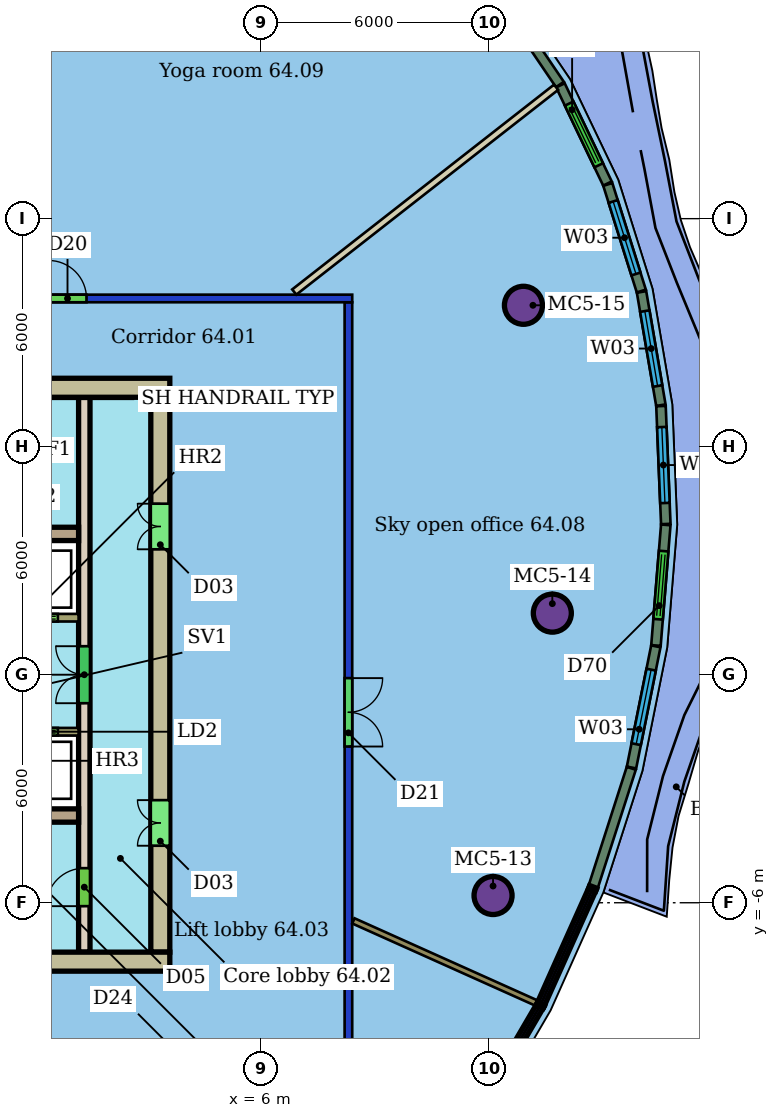
"""IFC4 building model, lengths in metres.
Left out: names, types, materials, properties, quantities, classifications, styles, units other than length and angle.
Written with IfcOpenShell. Run it as: python <this file> out.ifc"""

import sys

from ifc_helpers import new_model, si_unit, direction, frame, frame_2d, origin, origin_2d, place, context, subcontext, project, spatial, rectangle, hollow_circle, extrude, element, fill, save


model = new_model("IFC4")
c1 = context("Model", 3, precision=1e-05, world=origin(), true_north=direction((0.0, 1.0)))
c2 = subcontext(c1, "Body", "Model", "MODEL_VIEW")
j1 = project(units=[si_unit("LENGTHUNIT", "METRE"), si_unit("PLANEANGLEUNIT", "RADIAN")], contexts=[c1])
p1 = place(None, origin())
s1 = spatial("IfcSite", under=j1, at=p1, CompositionType="ELEMENT")
p2 = place(p1, origin())
s2 = spatial("IfcBuilding", under=s1, at=p2, CompositionType="ELEMENT")
p3 = place(p2, frame((0.0, 0.0, 261.3)))
s3 = spatial("IfcBuildingStorey", under=s2, at=p3, CompositionType="ELEMENT", Elevation=261.3)
for number, where, z_axis, x_axis in (
    (1, (12.106, -5.81, 0.0), (0.0, 0.0, 1.0), (1.0, 0.0, 0.0)),
    (2, (13.666, 1.62, 0.0), (0.0, 0.0, 1.0), (1.0, 0.0, 0.0)),
    (3, (12.906, 9.72, 0.0), (0.0, 0.0, 1.0), (1.0, 0.0, 0.0)),
):
    element("IfcColumn", number, at=place(p3, frame(where, z_axis=z_axis, x_axis=x_axis)), inside=s3, PredefinedType="COLUMN", context=c2, shape_type="SweptSolid", body=[
        extrude(hollow_circle(Radius=0.5, WallThickness=0.04, at=origin_2d()), origin(), (0.0, 0.0, 1.0), 3.45),
    ])
p4 = place(p3, frame((-20.4, 9.9, 0.0), z_axis=(0.0, 0.0, 1.0), x_axis=(1.0, 0.0, 0.0)))
e4 = element("IfcWall", 4, at=p4, inside=s3, PredefinedType="PARTITIONING", context=c2, shape_type="SweptSolid", body=[
    extrude(rectangle(XDim=28.8, YDim=0.2, at=frame_2d((14.4, 0.0))), origin(), (0.0, 0.0, 1.0), 3.1),
])
p5 = place(p4, frame((9.729, 0.0, 0.0)))
e5 = element("IfcOpeningElement", 5, at=p5, cuts=e4, PredefinedType="OPENING", context=c2, shape_type="SweptSolid", body=[
    extrude(rectangle(XDim=1.5, YDim=2.1, at=frame_2d((0.75, 1.05))), frame((0.0, 0.11, 0.0), z_axis=(0.0, -1.0, 0.0), x_axis=(1.0, 0.0, 0.0)), (0.0, 0.0, 1.0), 0.22),
])
p6 = place(p4, frame((20.808, 0.0, 0.0)))
e6 = element("IfcOpeningElement", 6, at=p6, cuts=e4, PredefinedType="OPENING", context=c2, shape_type="SweptSolid", body=[
    extrude(rectangle(XDim=1.0, YDim=2.1, at=frame_2d((0.5, 1.05))), frame((0.0, 0.11, 0.0), z_axis=(0.0, -1.0, 0.0), x_axis=(1.0, 0.0, 0.0)), (0.0, 0.0, 1.0), 0.22),
])
p7 = place(p3, frame((8.3, 9.8, 0.0), z_axis=(0.0, 0.0, 1.0), x_axis=(0.0, -1.0, 0.0)))
e7 = element("IfcWall", 7, at=p7, inside=s3, PredefinedType="PARTITIONING", context=c2, shape_type="SweptSolid", body=[
    extrude(rectangle(XDim=19.6, YDim=0.2, at=frame_2d((9.8, 0.0))), origin(), (0.0, 0.0, 1.0), 3.1),
])
p8 = place(p7, frame((9.889, 0.0, 0.0)))
e8 = element("IfcOpeningElement", 8, at=p8, cuts=e7, PredefinedType="OPENING", context=c2, shape_type="SweptSolid", body=[
    extrude(rectangle(XDim=1.8, YDim=2.1, at=frame_2d((0.9, 1.05))), frame((0.0, 0.11, 0.0), z_axis=(0.0, -1.0, 0.0), x_axis=(1.0, 0.0, 0.0)), (0.0, 0.0, 1.0), 0.22),
])
p9 = place(p3, frame((3.145, 23.736, 0.0), z_axis=(0.0, 0.0, 1.0), x_axis=(-0.359540454633, -0.933129498774, 0.0)))
e9 = element("IfcWall", 9, at=p9, inside=s3, PredefinedType="PARTITIONING", context=c2, shape_type="SweptSolid", body=[
    extrude(rectangle(XDim=14.686, YDim=0.175, at=frame_2d((7.343, 0.0))), origin(), (0.0, 0.0, 1.0), 3.45),
])
p10 = place(p3, frame((13.243, -8.637, 0.0), z_axis=(0.0, 0.0, 1.0), x_axis=(-0.912328117743, 0.409459894954, 0.0)))
e10 = element("IfcWall", 10, at=p10, inside=s3, PredefinedType="PARTITIONING", context=c2, shape_type="SweptSolid", body=[
    extrude(rectangle(XDim=5.274, YDim=0.15, at=frame_2d((2.637, 0.0))), origin(), (0.0, 0.0, 1.0), 3.45),
])
p11 = place(p3, frame((13.765, 15.457, 0.0), z_axis=(0.0, 0.0, 1.0), x_axis=(-0.787708163729, -0.616048576651, 0.0)))
e11 = element("IfcWall", 11, at=p11, inside=s3, PredefinedType="PARTITIONING", context=c2, shape_type="SweptSolid", body=[
    extrude(rectangle(XDim=8.747, YDim=0.175, at=frame_2d((4.374, 0.0))), origin(), (0.0, 0.0, 1.0), 3.45),
])
p12 = place(p3, frame((14.745, -5.569, 0.0), z_axis=(0.0, 0.0, 1.0), x_axis=(0.305926817151, 0.95205503126, 0.0)))
e12 = element("IfcWall", 12, at=p12, inside=s3, PredefinedType="SOLIDWALL", context=c2, shape_type="SweptSolid", body=[
    extrude(rectangle(XDim=3.262, YDim=0.25, at=frame_2d((1.631, 0.0))), origin(), (0.0, 0.0, 1.0), 3.15),
])
p13 = place(p3, frame((15.749, -2.442, 0.0), z_axis=(0.0, 0.0, 1.0), x_axis=(0.196910086412, 0.980421551104, 0.0)))
e13 = element("IfcWall", 13, at=p13, inside=s3, PredefinedType="SOLIDWALL", context=c2, shape_type="SweptSolid", body=[
    extrude(rectangle(XDim=3.252, YDim=0.25, at=frame_2d((1.626, 0.0))), origin(), (0.0, 0.0, 1.0), 3.15),
])
p14 = place(p13, frame((0.626, 0.0, 0.9)))
e14 = element("IfcOpeningElement", 14, at=p14, cuts=e13, PredefinedType="OPENING", context=c2, shape_type="SweptSolid", body=[
    extrude(rectangle(XDim=2.0, YDim=2.1, at=frame_2d((1.0, 1.05))), frame((0.0, 0.135, 0.0), z_axis=(0.0, -1.0, 0.0), x_axis=(1.0, 0.0, 0.0)), (0.0, 0.0, 1.0), 0.27),
])
p15 = place(p3, frame((16.393, 0.769, 0.0), z_axis=(0.0, 0.0, 1.0), x_axis=(0.081211205115, 0.996696914896, 0.0)))
e15 = element("IfcWall", 15, at=p15, inside=s3, PredefinedType="SOLIDWALL", context=c2, shape_type="SweptSolid", body=[
    extrude(rectangle(XDim=3.184, YDim=0.25, at=frame_2d((1.592, 0.0))), origin(), (0.0, 0.0, 1.0), 3.15),
])
p16 = place(p15, frame((0.692, 0.0, 0.0)))
e16 = element("IfcOpeningElement", 16, at=p16, cuts=e15, PredefinedType="OPENING", context=c2, shape_type="SweptSolid", body=[
    extrude(rectangle(XDim=1.8, YDim=2.4, at=frame_2d((0.9, 1.2))), frame((0.0, 0.135, 0.0), z_axis=(0.0, -1.0, 0.0), x_axis=(1.0, 0.0, 0.0)), (0.0, 0.0, 1.0), 0.27),
])
p17 = place(p3, frame((16.652, 3.965, 0.0), z_axis=(0.0, 0.0, 1.0), x_axis=(-0.040878469358, 0.999164126029, 0.0)))
e17 = element("IfcWall", 17, at=p17, inside=s3, PredefinedType="SOLIDWALL", context=c2, shape_type="SweptSolid", body=[
    extrude(rectangle(XDim=3.106, YDim=0.25, at=frame_2d((1.553, 0.0))), origin(), (0.0, 0.0, 1.0), 3.15),
])
p18 = place(p17, frame((0.553, 0.0, 0.9)))
e18 = element("IfcOpeningElement", 18, at=p18, cuts=e17, PredefinedType="OPENING", context=c2, shape_type="SweptSolid", body=[
    extrude(rectangle(XDim=2.0, YDim=2.1, at=frame_2d((1.0, 1.05))), frame((0.0, 0.135, 0.0), z_axis=(0.0, -1.0, 0.0), x_axis=(1.0, 0.0, 0.0)), (0.0, 0.0, 1.0), 0.27),
])
p19 = place(p3, frame((16.522, 7.092, 0.0), z_axis=(0.0, 0.0, 1.0), x_axis=(-0.168497464049, 0.985702087149, 0.0)))
e19 = element("IfcWall", 19, at=p19, inside=s3, PredefinedType="SOLIDWALL", context=c2, shape_type="SweptSolid", body=[
    extrude(rectangle(XDim=3.022, YDim=0.25, at=frame_2d((1.511, 0.0))), origin(), (0.0, 0.0, 1.0), 3.15),
])
p20 = place(p19, frame((0.511, 0.0, 0.9)))
e20 = element("IfcOpeningElement", 20, at=p20, cuts=e19, PredefinedType="OPENING", context=c2, shape_type="SweptSolid", body=[
    extrude(rectangle(XDim=2.0, YDim=2.1, at=frame_2d((1.0, 1.05))), frame((0.0, 0.135, 0.0), z_axis=(0.0, -1.0, 0.0), x_axis=(1.0, 0.0, 0.0)), (0.0, 0.0, 1.0), 0.27),
])
p21 = place(p3, frame((16.007, 10.096, 0.0), z_axis=(0.0, 0.0, 1.0), x_axis=(-0.299763978955, 0.954013394519, 0.0)))
e21 = element("IfcWall", 21, at=p21, inside=s3, PredefinedType="SOLIDWALL", context=c2, shape_type="SweptSolid", body=[
    extrude(rectangle(XDim=2.94, YDim=0.25, at=frame_2d((1.47, 0.0))), origin(), (0.0, 0.0, 1.0), 3.15),
])
p22 = place(p21, frame((0.47, 0.0, 0.9)))
e22 = element("IfcOpeningElement", 22, at=p22, cuts=e21, PredefinedType="OPENING", context=c2, shape_type="SweptSolid", body=[
    extrude(rectangle(XDim=2.0, YDim=2.1, at=frame_2d((1.0, 1.05))), frame((0.0, 0.135, 0.0), z_axis=(0.0, -1.0, 0.0), x_axis=(1.0, 0.0, 0.0)), (0.0, 0.0, 1.0), 0.27),
])
p23 = place(p3, frame((15.116, 12.925, 0.0), z_axis=(0.0, 0.0, 1.0), x_axis=(-0.432043625995, 0.901852707063, 0.0)))
e23 = element("IfcWall", 23, at=p23, inside=s3, PredefinedType="SOLIDWALL", context=c2, shape_type="SweptSolid", body=[
    extrude(rectangle(XDim=2.864, YDim=0.25, at=frame_2d((1.432, 0.0))), origin(), (0.0, 0.0, 1.0), 3.15),
])
p24 = place(p23, frame((0.532, 0.0, 0.0)))
e24 = element("IfcOpeningElement", 24, at=p24, cuts=e23, PredefinedType="OPENING", context=c2, shape_type="SweptSolid", body=[
    extrude(rectangle(XDim=1.8, YDim=2.4, at=frame_2d((0.9, 1.2))), frame((0.0, 0.135, 0.0), z_axis=(0.0, -1.0, 0.0), x_axis=(1.0, 0.0, 0.0)), (0.0, 0.0, 1.0), 0.27),
])
p25 = place(p3, frame((13.866, 15.531, 0.0), z_axis=(0.0, 0.0, 1.0), x_axis=(-0.561217901017, 0.827668090226, 0.0)))
e25 = element("IfcWall", 25, at=p25, inside=s3, PredefinedType="SOLIDWALL", context=c2, shape_type="SweptSolid", body=[
    extrude(rectangle(XDim=2.759, YDim=0.25, at=frame_2d((1.379, 0.0))), origin(), (0.0, 0.0, 1.0), 3.15),
])
p26 = place(p3, frame((3.6, 7.55, 0.0), z_axis=(0.0, 0.0, 1.0), x_axis=(-1.0, 0.0, 0.0)))
e26 = element("IfcWall", 26, at=p26, inside=s3, PredefinedType="SHEAR", context=c2, shape_type="SweptSolid", body=[
    extrude(rectangle(XDim=9.6, YDim=0.5, at=frame_2d((4.8, 0.0))), origin(), (0.0, 0.0, 1.0), 3.3),
])
p27 = place(p26, frame((3.2, 0.0, 0.0)))
e27 = element("IfcOpeningElement", 27, at=p27, cuts=e26, PredefinedType="OPENING", context=c2, shape_type="SweptSolid", body=[
    extrude(rectangle(XDim=1.2, YDim=2.1, at=frame_2d((0.6, 1.05))), frame((0.0, 0.26, 0.0), z_axis=(0.0, -1.0, 0.0), x_axis=(1.0, 0.0, 0.0)), (0.0, 0.0, 1.0), 0.52),
])
p28 = place(p3, frame((-15.6, -7.55, 0.0), z_axis=(0.0, 0.0, 1.0), x_axis=(1.0, 0.0, 0.0)))
e28 = element("IfcWall", 28, at=p28, inside=s3, PredefinedType="SHEAR", context=c2, shape_type="SweptSolid", body=[
    extrude(rectangle(XDim=19.2, YDim=0.5, at=frame_2d((9.6, 0.0))), origin(), (0.0, 0.0, 1.0), 3.3),
])
p29 = place(p28, frame((3.6, 0.0, 0.0)))
e29 = element("IfcOpeningElement", 29, at=p29, cuts=e28, PredefinedType="OPENING", context=c2, shape_type="SweptSolid", body=[
    extrude(rectangle(XDim=1.2, YDim=2.1, at=frame_2d((0.6, 1.05))), frame((0.0, 0.26, 0.0), z_axis=(0.0, -1.0, 0.0), x_axis=(1.0, 0.0, 0.0)), (0.0, 0.0, 1.0), 0.52),
])
p30 = place(p3, frame((3.35, -7.3, 0.0), z_axis=(0.0, 0.0, 1.0), x_axis=(0.0, 1.0, 0.0)))
e30 = element("IfcWall", 30, at=p30, inside=s3, PredefinedType="SHEAR", context=c2, shape_type="SweptSolid", body=[
    extrude(rectangle(XDim=14.6, YDim=0.5, at=frame_2d((7.3, 0.0))), origin(), (0.0, 0.0, 1.0), 3.3),
])
p31 = place(p30, frame((2.8, 0.0, 0.0)))
e31 = element("IfcOpeningElement", 31, at=p31, cuts=e30, PredefinedType="OPENING", context=c2, shape_type="SweptSolid", body=[
    extrude(rectangle(XDim=1.2, YDim=2.1, at=frame_2d((0.6, 1.05))), frame((0.0, 0.26, 0.0), z_axis=(0.0, -1.0, 0.0), x_axis=(1.0, 0.0, 0.0)), (0.0, 0.0, 1.0), 0.52),
])
p32 = place(p30, frame((10.6, 0.0, 0.0)))
e32 = element("IfcOpeningElement", 32, at=p32, cuts=e30, PredefinedType="OPENING", context=c2, shape_type="SweptSolid", body=[
    extrude(rectangle(XDim=1.2, YDim=2.1, at=frame_2d((0.6, 1.05))), frame((0.0, 0.26, 0.0), z_axis=(0.0, -1.0, 0.0), x_axis=(1.0, 0.0, 0.0)), (0.0, 0.0, 1.0), 0.52),
])
for number, where, z_axis, x_axis in (
    (33, (-6.0, 3.705, 0.0), (0.0, 0.0, 1.0), (1.0, 0.0, 0.0)),
    (34, (-6.0, -3.705, 0.0), (0.0, 0.0, 1.0), (1.0, 0.0, 0.0)),
):
    element("IfcWall", number, at=place(p3, frame(where, z_axis=z_axis, x_axis=x_axis)), inside=s3, PredefinedType="SHEAR", context=c2, shape_type="SweptSolid", body=[
        extrude(rectangle(XDim=7.2, YDim=0.35, at=frame_2d((3.6, 0.0))), origin(), (0.0, 0.0, 1.0), 3.3),
    ])
p33 = place(p3, frame((1.35, -7.3, 0.0), z_axis=(0.0, 0.0, 1.0), x_axis=(0.0, 1.0, 0.0)))
e35 = element("IfcWall", 35, at=p33, inside=s3, PredefinedType="SHEAR", context=c2, shape_type="SweptSolid", body=[
    extrude(rectangle(XDim=14.6, YDim=0.3, at=frame_2d((7.3, 0.0))), origin(), (0.0, 0.0, 1.0), 3.3),
])
p34 = place(p33, frame((1.21, 0.0, 0.0)))
e36 = element("IfcOpeningElement", 36, at=p34, cuts=e35, PredefinedType="OPENING", context=c2, shape_type="SweptSolid", body=[
    extrude(rectangle(XDim=1.0, YDim=2.1, at=frame_2d((0.5, 1.05))), frame((0.0, 0.16, 0.0), z_axis=(0.0, -1.0, 0.0), x_axis=(1.0, 0.0, 0.0)), (0.0, 0.0, 1.0), 0.32),
])
p35 = place(p33, frame((6.55, 0.0, 0.0)))
e37 = element("IfcOpeningElement", 37, at=p35, cuts=e35, PredefinedType="OPENING", context=c2, shape_type="SweptSolid", body=[
    extrude(rectangle(XDim=1.5, YDim=2.1, at=frame_2d((0.75, 1.05))), frame((0.0, 0.16, 0.0), z_axis=(0.0, -1.0, 0.0), x_axis=(1.0, 0.0, 0.0)), (0.0, 0.0, 1.0), 0.32),
])
p36 = place(p3, frame((-13.2, 1.5, 0.0), z_axis=(0.0, 0.0, 1.0), x_axis=(1.0, 0.0, 0.0)))
e38 = element("IfcWall", 38, at=p36, inside=s3, PredefinedType="SHEAR", context=c2, shape_type="SweptSolid", body=[
    extrude(rectangle(XDim=14.4, YDim=0.2, at=frame_2d((7.2, 0.0))), origin(), (0.0, 0.0, 1.0), 3.3),
])
p37 = place(p36, frame((10.312, 0.0, 0.0)))
e39 = element("IfcOpeningElement", 39, at=p37, cuts=e38, PredefinedType="OPENING", context=c2, shape_type="SweptSolid", body=[
    extrude(rectangle(XDim=1.1, YDim=2.1, at=frame_2d((0.55, 1.05))), frame((0.0, 0.11, 0.0), z_axis=(0.0, -1.0, 0.0), x_axis=(1.0, 0.0, 0.0)), (0.0, 0.0, 1.0), 0.22),
])
p38 = place(p36, frame((12.754, 0.0, 0.0)))
e40 = element("IfcOpeningElement", 40, at=p38, cuts=e38, PredefinedType="OPENING", context=c2, shape_type="SweptSolid", body=[
    extrude(rectangle(XDim=1.1, YDim=2.1, at=frame_2d((0.55, 1.05))), frame((0.0, 0.11, 0.0), z_axis=(0.0, -1.0, 0.0), x_axis=(1.0, 0.0, 0.0)), (0.0, 0.0, 1.0), 0.22),
])
p39 = place(p36, frame((0.15, 0.0, 0.0)))
e41 = element("IfcOpeningElement", 41, at=p39, cuts=e38, PredefinedType="OPENING", context=c2, shape_type="SweptSolid", body=[
    extrude(rectangle(XDim=0.9, YDim=2.1, at=frame_2d((0.45, 1.05))), frame((0.0, 0.11, 0.0), z_axis=(0.0, -1.0, 0.0), x_axis=(1.0, 0.0, 0.0)), (0.0, 0.0, 1.0), 0.22),
])
p40 = place(p36, frame((3.365, 0.0, 0.0)))
e42 = element("IfcOpeningElement", 42, at=p40, cuts=e38, PredefinedType="OPENING", context=c2, shape_type="SweptSolid", body=[
    extrude(rectangle(XDim=1.0, YDim=2.1, at=frame_2d((0.5, 1.05))), frame((0.0, 0.11, 0.0), z_axis=(0.0, -1.0, 0.0), x_axis=(1.0, 0.0, 0.0)), (0.0, 0.0, 1.0), 0.22),
])
p41 = place(p36, frame((8.467, 0.0, 0.0)))
e43 = element("IfcOpeningElement", 43, at=p41, cuts=e38, PredefinedType="OPENING", context=c2, shape_type="SweptSolid", body=[
    extrude(rectangle(XDim=0.9, YDim=2.1, at=frame_2d((0.45, 1.05))), frame((0.0, 0.11, 0.0), z_axis=(0.0, -1.0, 0.0), x_axis=(1.0, 0.0, 0.0)), (0.0, 0.0, 1.0), 0.22),
])
p42 = place(p3, frame((1.2, -1.5, 0.0), z_axis=(0.0, 0.0, 1.0), x_axis=(-1.0, 0.0, 0.0)))
e44 = element("IfcWall", 44, at=p42, inside=s3, PredefinedType="SHEAR", context=c2, shape_type="SweptSolid", body=[
    extrude(rectangle(XDim=14.4, YDim=0.2, at=frame_2d((7.2, 0.0))), origin(), (0.0, 0.0, 1.0), 3.3),
])
p43 = place(p42, frame((7.821, 0.0, 0.0)))
e45 = element("IfcOpeningElement", 45, at=p43, cuts=e44, PredefinedType="OPENING", context=c2, shape_type="SweptSolid", body=[
    extrude(rectangle(XDim=1.2, YDim=2.1, at=frame_2d((0.6, 1.05))), frame((0.0, 0.11, 0.0), z_axis=(0.0, -1.0, 0.0), x_axis=(1.0, 0.0, 0.0)), (0.0, 0.0, 1.0), 0.22),
])
p44 = place(p42, frame((0.546, 0.0, 0.0)))
e46 = element("IfcOpeningElement", 46, at=p44, cuts=e44, PredefinedType="OPENING", context=c2, shape_type="SweptSolid", body=[
    extrude(rectangle(XDim=1.1, YDim=2.1, at=frame_2d((0.55, 1.05))), frame((0.0, 0.11, 0.0), z_axis=(0.0, -1.0, 0.0), x_axis=(1.0, 0.0, 0.0)), (0.0, 0.0, 1.0), 0.22),
])
p45 = place(p42, frame((4.983, 0.0, 0.0)))
e47 = element("IfcOpeningElement", 47, at=p45, cuts=e44, PredefinedType="OPENING", context=c2, shape_type="SweptSolid", body=[
    extrude(rectangle(XDim=1.0, YDim=2.1, at=frame_2d((0.5, 1.05))), frame((0.0, 0.11, 0.0), z_axis=(0.0, -1.0, 0.0), x_axis=(1.0, 0.0, 0.0)), (0.0, 0.0, 1.0), 0.22),
])
p46 = place(p42, frame((2.592, 0.0, 0.0)))
e48 = element("IfcOpeningElement", 48, at=p46, cuts=e44, PredefinedType="OPENING", context=c2, shape_type="SweptSolid", body=[
    extrude(rectangle(XDim=1.0, YDim=2.1, at=frame_2d((0.5, 1.05))), frame((0.0, 0.11, 0.0), z_axis=(0.0, -1.0, 0.0), x_axis=(1.0, 0.0, 0.0)), (0.0, 0.0, 1.0), 0.22),
])
p47 = place(p8, origin())
e49 = element("IfcDoor", 49, at=p47, inside=s3, OperationType="DOUBLE_DOOR_SINGLE_SWING", PredefinedType="DOOR", context=c2, shape_type="SweptSolid", body=[
    extrude(rectangle(XDim=1.8, YDim=2.1, at=frame_2d((0.9, 1.05))), frame((0.0, 0.025, 0.0), z_axis=(0.0, -1.0, 0.0), x_axis=(1.0, 0.0, 0.0)), (0.0, 0.0, 1.0), 0.05),
])
fill(e8, e49)
p48 = place(p6, origin())
e50 = element("IfcDoor", 50, at=p48, inside=s3, OperationType="SINGLE_SWING_LEFT", PredefinedType="DOOR", context=c2, shape_type="SweptSolid", body=[
    extrude(rectangle(XDim=1.0, YDim=2.1, at=frame_2d((0.5, 1.05))), frame((0.0, 0.025, 0.0), z_axis=(0.0, -1.0, 0.0), x_axis=(1.0, 0.0, 0.0)), (0.0, 0.0, 1.0), 0.05),
])
fill(e6, e50)
p49 = place(p14, origin())
e51 = element("IfcWindow", 51, at=p49, inside=s3, PartitioningType="SINGLE_PANEL", PredefinedType="WINDOW", context=c2, shape_type="SweptSolid", body=[
    extrude(rectangle(XDim=2.0, YDim=2.1, at=frame_2d((1.0, 1.05))), frame((0.0, 0.03, 0.0), z_axis=(0.0, -1.0, 0.0), x_axis=(1.0, 0.0, 0.0)), (0.0, 0.0, 1.0), 0.06),
])
fill(e14, e51)
p50 = place(p16, origin())
e52 = element("IfcDoor", 52, at=p50, inside=s3, OperationType="DOUBLE_DOOR_SLIDING", PredefinedType="DOOR", context=c2, shape_type="SweptSolid", body=[
    extrude(rectangle(XDim=1.8, YDim=2.4, at=frame_2d((0.9, 1.2))), frame((0.0, 0.025, 0.0), z_axis=(0.0, -1.0, 0.0), x_axis=(1.0, 0.0, 0.0)), (0.0, 0.0, 1.0), 0.05),
])
fill(e16, e52)
p51 = place(p18, origin())
e53 = element("IfcWindow", 53, at=p51, inside=s3, PartitioningType="SINGLE_PANEL", PredefinedType="WINDOW", context=c2, shape_type="SweptSolid", body=[
    extrude(rectangle(XDim=2.0, YDim=2.1, at=frame_2d((1.0, 1.05))), frame((0.0, 0.03, 0.0), z_axis=(0.0, -1.0, 0.0), x_axis=(1.0, 0.0, 0.0)), (0.0, 0.0, 1.0), 0.06),
])
fill(e18, e53)
p52 = place(p20, origin())
e54 = element("IfcWindow", 54, at=p52, inside=s3, PartitioningType="SINGLE_PANEL", PredefinedType="WINDOW", context=c2, shape_type="SweptSolid", body=[
    extrude(rectangle(XDim=2.0, YDim=2.1, at=frame_2d((1.0, 1.05))), frame((0.0, 0.03, 0.0), z_axis=(0.0, -1.0, 0.0), x_axis=(1.0, 0.0, 0.0)), (0.0, 0.0, 1.0), 0.06),
])
fill(e20, e54)
p53 = place(p22, origin())
e55 = element("IfcWindow", 55, at=p53, inside=s3, PartitioningType="SINGLE_PANEL", PredefinedType="WINDOW", context=c2, shape_type="SweptSolid", body=[
    extrude(rectangle(XDim=2.0, YDim=2.1, at=frame_2d((1.0, 1.05))), frame((0.0, 0.03, 0.0), z_axis=(0.0, -1.0, 0.0), x_axis=(1.0, 0.0, 0.0)), (0.0, 0.0, 1.0), 0.06),
])
fill(e22, e55)
p54 = place(p24, origin())
e56 = element("IfcDoor", 56, at=p54, inside=s3, OperationType="DOUBLE_DOOR_SLIDING", PredefinedType="DOOR", context=c2, shape_type="SweptSolid", body=[
    extrude(rectangle(XDim=1.8, YDim=2.4, at=frame_2d((0.9, 1.2))), frame((0.0, 0.025, 0.0), z_axis=(0.0, -1.0, 0.0), x_axis=(1.0, 0.0, 0.0)), (0.0, 0.0, 1.0), 0.05),
])
fill(e24, e56)
p55 = place(p31, origin())
e57 = element("IfcDoor", 57, at=p55, inside=s3, OperationType="DOUBLE_DOOR_SINGLE_SWING", PredefinedType="NOTDEFINED", context=c2, shape_type="SweptSolid", body=[
    extrude(rectangle(XDim=1.2, YDim=2.1, at=frame_2d((0.6, 1.05))), frame((0.0, 0.025, 0.0), z_axis=(0.0, -1.0, 0.0), x_axis=(1.0, 0.0, 0.0)), (0.0, 0.0, 1.0), 0.05),
])
fill(e31, e57)
p56 = place(p32, origin())
e58 = element("IfcDoor", 58, at=p56, inside=s3, OperationType="DOUBLE_DOOR_SINGLE_SWING", PredefinedType="NOTDEFINED", context=c2, shape_type="SweptSolid", body=[
    extrude(rectangle(XDim=1.2, YDim=2.1, at=frame_2d((0.6, 1.05))), frame((0.0, 0.025, 0.0), z_axis=(0.0, -1.0, 0.0), x_axis=(1.0, 0.0, 0.0)), (0.0, 0.0, 1.0), 0.05),
])
fill(e32, e58)
p57 = place(p34, origin())
e59 = element("IfcDoor", 59, at=p57, inside=s3, OperationType="SINGLE_SWING_LEFT", PredefinedType="NOTDEFINED", context=c2, shape_type="SweptSolid", body=[
    extrude(rectangle(XDim=1.0, YDim=2.1, at=frame_2d((0.5, 1.05))), frame((0.0, 0.025, 0.0), z_axis=(0.0, -1.0, 0.0), x_axis=(1.0, 0.0, 0.0)), (0.0, 0.0, 1.0), 0.05),
])
fill(e36, e59)
p58 = place(p35, origin())
e60 = element("IfcDoor", 60, at=p58, inside=s3, OperationType="DOUBLE_DOOR_SINGLE_SWING", PredefinedType="NOTDEFINED", context=c2, shape_type="SweptSolid", body=[
    extrude(rectangle(XDim=1.5, YDim=2.1, at=frame_2d((0.75, 1.05))), frame((0.0, 0.025, 0.0), z_axis=(0.0, -1.0, 0.0), x_axis=(1.0, 0.0, 0.0)), (0.0, 0.0, 1.0), 0.05),
])
fill(e37, e60)
p59 = place(p38, origin())
e61 = element("IfcDoor", 61, at=p59, inside=s3, OperationType="DOUBLE_DOOR_SLIDING", PredefinedType="NOTDEFINED", context=c2, shape_type="SweptSolid", body=[
    extrude(rectangle(XDim=1.1, YDim=2.1, at=frame_2d((0.55, 1.05))), frame((0.0, 0.025, 0.0), z_axis=(0.0, -1.0, 0.0), x_axis=(1.0, 0.0, 0.0)), (0.0, 0.0, 1.0), 0.05),
])
fill(e40, e61)
p60 = place(p44, origin())
e62 = element("IfcDoor", 62, at=p60, inside=s3, OperationType="DOUBLE_DOOR_SLIDING", PredefinedType="NOTDEFINED", context=c2, shape_type="SweptSolid", body=[
    extrude(rectangle(XDim=1.1, YDim=2.1, at=frame_2d((0.55, 1.05))), frame((0.0, 0.025, 0.0), z_axis=(0.0, -1.0, 0.0), x_axis=(1.0, 0.0, 0.0)), (0.0, 0.0, 1.0), 0.05),
])
fill(e46, e62)
save(model, sys.argv[1])
